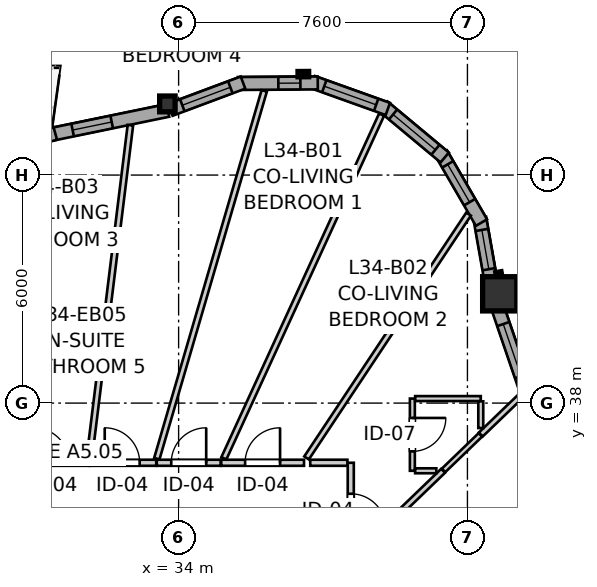
"""IFC4 building model, lengths in metres.
Left out: names, types, materials, properties, quantities, classifications, styles, units other than length and angle.
Written with IfcOpenShell. Run it as: python <this file> out.ifc"""

import sys

from ifc_helpers import new_model, si_unit, direction, frame, frame_2d, origin, origin_2d, place, context, subcontext, project, spatial, rectangle, i_section, extrude, source, transform, mapped, element, fill, save


model = new_model("IFC4")
c1 = context("Model", 3, precision=1e-05, world=origin(), true_north=direction((0.0, 1.0)))
c2 = subcontext(c1, "Body", "Model", "MODEL_VIEW")
j1 = project(units=[si_unit("LENGTHUNIT", "METRE"), si_unit("PLANEANGLEUNIT", "RADIAN")], contexts=[c1])
p1 = place(None, origin())
s1 = spatial("IfcSite", under=j1, at=p1, CompositionType="ELEMENT")
p2 = place(p1, origin())
s2 = spatial("IfcBuilding", under=s1, at=p2, CompositionType="ELEMENT")
p3 = place(p2, frame((0.0, 0.0, 115.2)))
s3 = spatial("IfcBuildingStorey", under=s2, at=p3, CompositionType="ELEMENT", Elevation=115.2)
m1 = source(origin(), c2, "Body", "SweptSolid", [
    extrude(rectangle(XDim=0.9, YDim=0.9, at=origin_2d()), origin(), (0.0, 0.0, 1.0), 2.95),
])
p4 = place(p3, frame((42.45, 40.875, 0.0), z_axis=(0.0, 0.0, 1.0), x_axis=(1.0, 0.0, 0.0)))
e1 = element("IfcColumn", 1, at=p4, inside=s3, PredefinedType="COLUMN", context=c2, shape_type="MappedRepresentation", body=[
    mapped(m1, transform((0.0, 0.0, 0.0), x_axis=(1.0, 0.0, 0.0), y_axis=(0.0, 1.0, 0.0), z_axis=(0.0, 0.0, 1.0), scale=1.0)),
])
m2 = source(origin(), c2, "Body", "SweptSolid", [
    extrude(i_section(OverallWidth=0.406, OverallDepth=0.416, WebThickness=0.027, FlangeThickness=0.044, FilletRadius=0.015, at=origin_2d()), origin(), (0.0, 0.0, 1.0), 2.95),
])
p5 = place(p3, frame((33.704, 45.872, 0.0), z_axis=(0.0, 0.0, 1.0), x_axis=(1.0, 0.0, 0.0)))
e2 = element("IfcColumn", 2, at=p5, inside=s3, PredefinedType="PILASTER", context=c2, shape_type="MappedRepresentation", body=[
    mapped(m2, transform((0.0, 0.0, 0.0), x_axis=(1.0, 0.0, 0.0), y_axis=(0.0, 1.0, 0.0), z_axis=(0.0, 0.0, 1.0), scale=1.0)),
])
p6 = place(p3, frame((43.319, 37.809, 0.0), z_axis=(0.0, 0.0, 1.0), x_axis=(-0.323586371726, 0.946198636669, 0.0)))
e3 = element("IfcWall", 3, at=p6, inside=s3, PredefinedType="SOLIDWALL", context=c2, shape_type="SweptSolid", body=[
    extrude(rectangle(XDim=2.952, YDim=0.34, at=frame_2d((1.476, 0.0))), origin(), (0.0, 0.0, 1.0), 2.48),
])
p7 = place(p6, frame((0.949, 0.0, 0.82)))
e4 = element("IfcOpeningElement", 4, at=p7, cuts=e3, PredefinedType="OPENING", context=c2, shape_type="SweptSolid", body=[
    extrude(rectangle(XDim=1.45, YDim=1.25, at=frame_2d((0.725, 0.625))), frame((0.0, 0.18, 0.0), z_axis=(0.0, -1.0, 0.0), x_axis=(1.0, 0.0, 0.0)), (0.0, 0.0, 1.0), 0.36),
])
p8 = place(p3, frame((42.242, 41.072, 0.0), z_axis=(0.0, 0.0, 1.0), x_axis=(-0.17440141227, 0.984674640375, 0.0)))
e5 = element("IfcWall", 5, at=p8, inside=s3, PredefinedType="SOLIDWALL", context=c2, shape_type="SweptSolid", body=[
    extrude(rectangle(XDim=1.831, YDim=0.34, at=frame_2d((0.916, 0.0))), origin(), (0.0, 0.0, 1.0), 2.48),
])
p9 = place(p8, frame((0.457, 0.0, 0.82)))
e6 = element("IfcOpeningElement", 6, at=p9, cuts=e5, PredefinedType="OPENING", context=c2, shape_type="SweptSolid", body=[
    extrude(rectangle(XDim=1.05, YDim=1.45, at=frame_2d((0.525, 0.725))), frame((0.0, 0.18, 0.0), z_axis=(0.0, -1.0, 0.0), x_axis=(1.0, 0.0, 0.0)), (0.0, 0.0, 1.0), 0.36),
])
p10 = place(p3, frame((41.969, 42.749, 0.0), z_axis=(0.0, 0.0, 1.0), x_axis=(-0.501989603552, 0.864873654313, 0.0)))
e7 = element("IfcWall", 7, at=p10, inside=s3, PredefinedType="SOLIDWALL", context=c2, shape_type="SweptSolid", body=[
    extrude(rectangle(XDim=2.099, YDim=0.34, at=frame_2d((1.05, 0.0))), origin(), (0.0, 0.0, 1.0), 2.48),
])
p11 = place(p10, frame((0.622, 0.0, 0.82)))
e8 = element("IfcOpeningElement", 8, at=p11, cuts=e7, PredefinedType="OPENING", context=c2, shape_type="SweptSolid", body=[
    extrude(rectangle(XDim=1.15, YDim=1.2, at=frame_2d((0.575, 0.6))), frame((0.0, 0.18, 0.0), z_axis=(0.0, -1.0, 0.0), x_axis=(1.0, 0.0, 0.0)), (0.0, 0.0, 1.0), 0.36),
])
p12 = place(p3, frame((41.002, 44.462, 0.0), z_axis=(0.0, 0.0, 1.0), x_axis=(-0.768488123124, 0.639864051669, 0.0)))
e9 = element("IfcWall", 9, at=p12, inside=s3, PredefinedType="SOLIDWALL", context=c2, shape_type="SweptSolid", body=[
    extrude(rectangle(XDim=2.099, YDim=0.34, at=frame_2d((1.05, 0.0))), origin(), (0.0, 0.0, 1.0), 2.48),
])
p13 = place(p12, frame((0.319, 0.0, 0.82)))
e10 = element("IfcOpeningElement", 10, at=p13, cuts=e9, PredefinedType="OPENING", context=c2, shape_type="SweptSolid", body=[
    extrude(rectangle(XDim=1.45, YDim=1.25, at=frame_2d((0.725, 0.625))), frame((0.0, 0.18, 0.0), z_axis=(0.0, -1.0, 0.0), x_axis=(1.0, 0.0, 0.0)), (0.0, 0.0, 1.0), 0.36),
])
p14 = place(p3, frame((39.506, 45.739, 0.0), z_axis=(0.0, 0.0, 1.0), x_axis=(-0.941486401639, 0.33705096874, 0.0)))
e11 = element("IfcWall", 11, at=p14, inside=s3, PredefinedType="SOLIDWALL", context=c2, shape_type="SweptSolid", body=[
    extrude(rectangle(XDim=2.099, YDim=0.34, at=frame_2d((1.05, 0.0))), origin(), (0.0, 0.0, 1.0), 2.48),
])
p15 = place(p14, frame((0.327, 0.0, 0.82)))
e12 = element("IfcOpeningElement", 12, at=p15, cuts=e11, PredefinedType="OPENING", context=c2, shape_type="SweptSolid", body=[
    extrude(rectangle(XDim=1.45, YDim=1.25, at=frame_2d((0.725, 0.625))), frame((0.0, 0.18, 0.0), z_axis=(0.0, -1.0, 0.0), x_axis=(1.0, 0.0, 0.0)), (0.0, 0.0, 1.0), 0.36),
])
p16 = place(p3, frame((37.662, 46.424, 0.0), z_axis=(0.0, 0.0, 1.0), x_axis=(-0.999976456891, -0.00686189939, 0.0)))
e13 = element("IfcWall", 13, at=p16, inside=s3, PredefinedType="SOLIDWALL", context=c2, shape_type="SweptSolid", body=[
    extrude(rectangle(XDim=2.099, YDim=0.34, at=frame_2d((1.05, 0.0))), origin(), (0.0, 0.0, 1.0), 2.48),
])
p17 = place(p16, frame((0.458, 0.0, 0.82)))
e14 = element("IfcOpeningElement", 14, at=p17, cuts=e13, PredefinedType="OPENING", context=c2, shape_type="SweptSolid", body=[
    extrude(rectangle(XDim=0.58, YDim=1.35, at=frame_2d((0.29, 0.675))), frame((0.0, 0.18, 0.0), z_axis=(0.0, -1.0, 0.0), x_axis=(1.0, 0.0, 0.0)), (0.0, 0.0, 1.0), 0.36),
])
p18 = place(p3, frame((35.695, 46.434, 0.0), z_axis=(0.0, 0.0, 1.0), x_axis=(-0.9368002254, -0.349864741994, 0.0)))
e15 = element("IfcWall", 15, at=p18, inside=s3, PredefinedType="SOLIDWALL", context=c2, shape_type="SweptSolid", body=[
    extrude(rectangle(XDim=2.041, YDim=0.34, at=frame_2d((1.021, 0.0))), origin(), (0.0, 0.0, 1.0), 2.48),
])
p19 = place(p18, frame((0.355, 0.0, 0.82)))
e16 = element("IfcOpeningElement", 16, at=p19, cuts=e15, PredefinedType="OPENING", context=c2, shape_type="SweptSolid", body=[
    extrude(rectangle(XDim=1.35, YDim=1.45, at=frame_2d((0.675, 0.725))), frame((0.0, 0.18, 0.0), z_axis=(0.0, -1.0, 0.0), x_axis=(1.0, 0.0, 0.0)), (0.0, 0.0, 1.0), 0.36),
])
p20 = place(p3, frame((33.719, 45.701, 0.0), z_axis=(0.0, 0.0, 1.0), x_axis=(-0.979417849231, -0.201843198072, 0.0)))
e17 = element("IfcWall", 17, at=p20, inside=s3, PredefinedType="SOLIDWALL", context=c2, shape_type="SweptSolid", body=[
    extrude(rectangle(XDim=3.113, YDim=0.34, at=frame_2d((1.557, 0.0))), origin(), (0.0, 0.0, 1.0), 2.48),
])
p21 = place(p20, frame((1.511, 0.0, 0.82)))
e18 = element("IfcOpeningElement", 18, at=p21, cuts=e17, PredefinedType="OPENING", context=c2, shape_type="SweptSolid", body=[
    extrude(rectangle(XDim=1.05, YDim=1.45, at=frame_2d((0.525, 0.725))), frame((0.0, 0.18, 0.0), z_axis=(0.0, -1.0, 0.0), x_axis=(1.0, 0.0, 0.0)), (0.0, 0.0, 1.0), 0.36),
])
p22 = place(p3, frame((30.755, 45.094, 0.0), z_axis=(0.0, 0.0, 1.0), x_axis=(-0.963040794714, -0.269355578589, 0.0)))
e19 = element("IfcWall", 19, at=p22, inside=s3, PredefinedType="SOLIDWALL", context=c2, shape_type="SweptSolid", body=[
    extrude(rectangle(XDim=2.839, YDim=0.34, at=frame_2d((1.419, 0.0))), origin(), (0.0, 0.0, 1.0), 2.48),
])
p23 = place(p22, frame((0.373, 0.0, 0.82)))
e20 = element("IfcOpeningElement", 20, at=p23, cuts=e19, PredefinedType="OPENING", context=c2, shape_type="SweptSolid", body=[
    extrude(rectangle(XDim=1.05, YDim=1.45, at=frame_2d((0.525, 0.725))), frame((0.0, 0.18, 0.0), z_axis=(0.0, -1.0, 0.0), x_axis=(1.0, 0.0, 0.0)), (0.0, 0.0, 1.0), 0.36),
])
p24 = place(p22, frame((1.792, 0.0, 0.82)))
e21 = element("IfcOpeningElement", 21, at=p24, cuts=e19, PredefinedType="OPENING", context=c2, shape_type="SweptSolid", body=[
    extrude(rectangle(XDim=0.58, YDim=1.35, at=frame_2d((0.29, 0.675))), frame((0.0, 0.18, 0.0), z_axis=(0.0, -1.0, 0.0), x_axis=(1.0, 0.0, 0.0)), (0.0, 0.0, 1.0), 0.36),
])
p25 = place(p3, frame((38.53, 36.43, 0.0), z_axis=(0.0, 0.0, 1.0), x_axis=(0.0, -1.0, 0.0)))
e22 = element("IfcWall", 22, at=p25, inside=s3, PredefinedType="PARTITIONING", context=c2, shape_type="SweptSolid", body=[
    extrude(rectangle(XDim=2.516, YDim=0.16, at=frame_2d((1.258, 0.0))), origin(), (0.0, 0.0, 1.0), 2.588),
])
p26 = place(p25, frame((0.816, 0.0, 0.0)))
e23 = element("IfcOpeningElement", 23, at=p26, cuts=e22, PredefinedType="OPENING", context=c2, shape_type="SweptSolid", body=[
    extrude(rectangle(XDim=0.92, YDim=2.1, at=frame_2d((0.46, 1.05))), frame((0.0, 0.09, 0.0), z_axis=(0.0, -1.0, 0.0), x_axis=(1.0, 0.0, 0.0)), (0.0, 0.0, 1.0), 0.18),
])
p27 = place(p3, frame((35.121, 36.43, 0.0), z_axis=(0.0, 0.0, 1.0), x_axis=(1.0, 0.0, 0.0)))
e24 = element("IfcWall", 24, at=p27, inside=s3, PredefinedType="PARTITIONING", context=c2, shape_type="SweptSolid", body=[
    extrude(rectangle(XDim=2.179, YDim=0.16, at=frame_2d((1.089, 0.0))), origin(), (0.0, 0.0, 1.0), 2.588),
])
p28 = place(p27, frame((0.628, 0.0, 0.0)))
e25 = element("IfcOpeningElement", 25, at=p28, cuts=e24, PredefinedType="OPENING", context=c2, shape_type="SweptSolid", body=[
    extrude(rectangle(XDim=0.92, YDim=2.1, at=frame_2d((0.46, 1.05))), frame((0.0, 0.09, 0.0), z_axis=(0.0, -1.0, 0.0), x_axis=(1.0, 0.0, 0.0)), (0.0, 0.0, 1.0), 0.18),
])
p29 = place(p3, frame((29.7, 36.43, 0.0), z_axis=(0.0, 0.0, 1.0), x_axis=(1.0, 0.0, 0.0)))
e26 = element("IfcWall", 26, at=p29, inside=s3, PredefinedType="PARTITIONING", context=c2, shape_type="SweptSolid", body=[
    extrude(rectangle(XDim=1.951, YDim=0.16, at=frame_2d((0.976, 0.0))), origin(), (0.0, 0.0, 1.0), 2.95),
])
p30 = place(p29, frame((0.493, 0.0, 0.0)))
e27 = element("IfcOpeningElement", 27, at=p30, cuts=e26, PredefinedType="OPENING", context=c2, shape_type="SweptSolid", body=[
    extrude(rectangle(XDim=0.92, YDim=2.1, at=frame_2d((0.46, 1.05))), frame((0.0, 0.09, 0.0), z_axis=(0.0, -1.0, 0.0), x_axis=(1.0, 0.0, 0.0)), (0.0, 0.0, 1.0), 0.18),
])
p31 = place(p3, frame((40.151, 38.119, 0.0), z_axis=(0.0, 0.0, 1.0), x_axis=(0.0, -1.0, 0.0)))
e28 = element("IfcWall", 28, at=p31, inside=s3, PredefinedType="PARTITIONING", context=c2, shape_type="SweptSolid", body=[
    extrude(rectangle(XDim=1.9, YDim=0.13, at=frame_2d((0.95, 0.0))), origin(), (0.0, 0.0, 1.0), 2.95),
])
p32 = place(p31, frame((0.51, 0.0, 0.0)))
e29 = element("IfcOpeningElement", 29, at=p32, cuts=e28, PredefinedType="OPENING", context=c2, shape_type="SweptSolid", body=[
    extrude(rectangle(XDim=0.88, YDim=2.05, at=frame_2d((0.44, 1.025))), frame((0.0, 0.075, 0.0), z_axis=(0.0, -1.0, 0.0), x_axis=(1.0, 0.0, 0.0)), (0.0, 0.0, 1.0), 0.15),
])
p33 = place(p3, frame((31.666, 36.43, 0.0), z_axis=(0.0, 0.0, 1.0), x_axis=(1.0, 0.0, 0.0)))
e30 = element("IfcWall", 30, at=p33, inside=s3, PredefinedType="PARTITIONING", context=c2, shape_type="SweptSolid", body=[
    extrude(rectangle(XDim=1.745, YDim=0.16, at=frame_2d((0.873, 0.0))), origin(), (0.0, 0.0, 1.0), 2.95),
])
p34 = place(p33, frame((0.389, 0.0, 0.0)))
e31 = element("IfcOpeningElement", 31, at=p34, cuts=e30, PredefinedType="OPENING", context=c2, shape_type="SweptSolid", body=[
    extrude(rectangle(XDim=0.92, YDim=2.1, at=frame_2d((0.46, 1.05))), frame((0.0, 0.09, 0.0), z_axis=(0.0, -1.0, 0.0), x_axis=(1.0, 0.0, 0.0)), (0.0, 0.0, 1.0), 0.18),
])
p35 = place(p3, frame((33.426, 36.43, 0.0), z_axis=(0.0, 0.0, 1.0), x_axis=(1.0, 0.0, 0.0)))
e32 = element("IfcWall", 32, at=p35, inside=s3, PredefinedType="PARTITIONING", context=c2, shape_type="SweptSolid", body=[
    extrude(rectangle(XDim=1.68, YDim=0.16, at=frame_2d((0.84, 0.0))), origin(), (0.0, 0.0, 1.0), 2.95),
])
p36 = place(p35, frame((0.38, 0.0, 0.0)))
e33 = element("IfcOpeningElement", 33, at=p36, cuts=e32, PredefinedType="OPENING", context=c2, shape_type="SweptSolid", body=[
    extrude(rectangle(XDim=0.92, YDim=2.1, at=frame_2d((0.46, 1.05))), frame((0.0, 0.09, 0.0), z_axis=(0.0, -1.0, 0.0), x_axis=(1.0, 0.0, 0.0)), (0.0, 0.0, 1.0), 0.18),
])
p37 = place(p3, frame((33.427, 36.538, 0.0), z_axis=(0.0, 0.0, 1.0), x_axis=(0.280326379037, 0.959904745908, 0.0)))
e34 = element("IfcWall", 34, at=p37, inside=s3, PredefinedType="PARTITIONING", context=c2, shape_type="SweptSolid", body=[
    extrude(rectangle(XDim=10.082, YDim=0.145, at=frame_2d((5.041, 0.0))), origin(), (0.0, 0.0, 1.0), 2.95),
])
p38 = place(p3, frame((35.191, 36.548, 0.0), z_axis=(0.0, 0.0, 1.0), x_axis=(0.417154036681, 0.908835799075, 0.0)))
e35 = element("IfcWall", 35, at=p38, inside=s3, PredefinedType="PARTITIONING", context=c2, shape_type="SweptSolid", body=[
    extrude(rectangle(XDim=9.949, YDim=0.145, at=frame_2d((4.974, 0.0))), origin(), (0.0, 0.0, 1.0), 2.95),
])
p39 = place(p3, frame((31.648, 36.527, 0.0), z_axis=(0.0, 0.0, 1.0), x_axis=(0.122371290087, 0.992484391496, 0.0)))
e36 = element("IfcWall", 36, at=p39, inside=s3, PredefinedType="PARTITIONING", context=c2, shape_type="SweptSolid", body=[
    extrude(rectangle(XDim=8.852, YDim=0.145, at=frame_2d((4.426, 0.0))), origin(), (0.0, 0.0, 1.0), 2.95),
])
p40 = place(p3, frame((37.366, 36.557, 0.0), z_axis=(0.0, 0.0, 1.0), x_axis=(0.553463679146, 0.832873313215, 0.0)))
e37 = element("IfcWall", 37, at=p40, inside=s3, PredefinedType="PARTITIONING", context=c2, shape_type="SweptSolid", body=[
    extrude(rectangle(XDim=7.704, YDim=0.145, at=frame_2d((3.852, 0.0))), origin(), (0.0, 0.0, 1.0), 2.95),
])
p41 = place(p3, frame((38.666, 34.009, 0.0), z_axis=(0.0, 0.0, 1.0), x_axis=(0.72031454127, 0.693647577402, 0.0)))
e38 = element("IfcWall", 38, at=p41, inside=s3, PredefinedType="PARTITIONING", context=c2, shape_type="SweptSolid", body=[
    extrude(rectangle(XDim=3.186, YDim=0.145, at=frame_2d((1.593, 0.0))), origin(), (0.0, 0.0, 1.0), 2.95),
])
p42 = place(p3, frame((40.224, 38.119, 0.0), z_axis=(0.0, 0.0, 1.0), x_axis=(1.0, 0.0, 0.0)))
e39 = element("IfcWall", 39, at=p42, inside=s3, PredefinedType="PARTITIONING", context=c2, shape_type="SweptSolid", body=[
    extrude(rectangle(XDim=1.727, YDim=0.13, at=frame_2d((0.863, 0.0))), origin(), (0.0, 0.0, 1.0), 2.95),
])
p43 = place(p3, frame((41.951, 37.173, 0.0), z_axis=(0.0, 0.0, 1.0), x_axis=(0.720559112487, 0.693393514111, 0.0)))
e40 = element("IfcWall", 40, at=p43, inside=s3, PredefinedType="PARTITIONING", context=c2, shape_type="SweptSolid", body=[
    extrude(rectangle(XDim=1.456, YDim=0.145, at=frame_2d((0.728, 0.0))), origin(), (0.0, 0.0, 1.0), 2.95),
])
p44 = place(p3, frame((40.972, 36.229, 0.0), z_axis=(0.0, 0.0, 1.0), x_axis=(0.72014550452, 0.693823069896, 0.0)))
e41 = element("IfcWall", 41, at=p44, inside=s3, PredefinedType="PARTITIONING", context=c2, shape_type="SweptSolid", body=[
    extrude(rectangle(XDim=1.345, YDim=0.13, at=frame_2d((0.672, 0.0))), origin(), (0.0, 0.0, 1.0), 2.95),
])
p45 = place(p3, frame((37.463, 36.43, 0.0), z_axis=(0.0, 0.0, 1.0), x_axis=(1.0, 0.0, 0.0)))
e42 = element("IfcWall", 42, at=p45, inside=s3, PredefinedType="PARTITIONING", context=c2, shape_type="SweptSolid", body=[
    extrude(rectangle(XDim=0.979, YDim=0.16, at=frame_2d((0.489, 0.0))), origin(), (0.0, 0.0, 1.0), 2.588),
])
p46 = place(p3, frame((41.951, 37.344, 0.0), z_axis=(0.0, 0.0, 1.0), x_axis=(0.0, 1.0, 0.0)))
e43 = element("IfcWall", 43, at=p46, inside=s3, PredefinedType="PARTITIONING", context=c2, shape_type="SweptSolid", body=[
    extrude(rectangle(XDim=0.702, YDim=0.13, at=frame_2d((0.351, 0.0))), origin(), (0.0, 0.0, 1.0), 2.95),
])
p47 = place(p3, frame((40.224, 36.219, 0.0), z_axis=(0.0, 0.0, 1.0), x_axis=(1.0, 0.0, 0.0)))
e44 = element("IfcWall", 44, at=p47, inside=s3, PredefinedType="PARTITIONING", context=c2, shape_type="SweptSolid", body=[
    extrude(rectangle(XDim=0.557, YDim=0.13, at=frame_2d((0.278, 0.0))), origin(), (0.0, 0.0, 1.0), 2.95),
])
m3 = source(origin(), c2, "Body", "SweptSolid", [
    extrude(rectangle(XDim=1.45, YDim=1.25, at=frame_2d((0.725, 0.625))), frame((0.0, 0.03, 0.0), z_axis=(0.0, -1.0, 0.0), x_axis=(1.0, 0.0, 0.0)), (0.0, 0.0, 1.0), 0.06),
])
p48 = place(p7, origin())
e45 = element("IfcWindow", 45, at=p48, inside=s3, PartitioningType="SINGLE_PANEL", PredefinedType="WINDOW", context=c2, shape_type="MappedRepresentation", body=[
    mapped(m3, transform((0.0, 0.0, 0.0), x_axis=(1.0, 0.0, 0.0), y_axis=(0.0, 1.0, 0.0), z_axis=(0.0, 0.0, 1.0), scale=1.0)),
])
fill(e4, e45)
m4 = source(origin(), c2, "Body", "SweptSolid", [
    extrude(rectangle(XDim=1.05, YDim=1.45, at=frame_2d((0.525, 0.725))), frame((0.0, 0.03, 0.0), z_axis=(0.0, -1.0, 0.0), x_axis=(1.0, 0.0, 0.0)), (0.0, 0.0, 1.0), 0.06),
])
p49 = place(p9, origin())
e46 = element("IfcWindow", 46, at=p49, inside=s3, PartitioningType="SINGLE_PANEL", PredefinedType="WINDOW", context=c2, shape_type="MappedRepresentation", body=[
    mapped(m4, transform((0.0, 0.0, 0.0), x_axis=(1.0, 0.0, 0.0), y_axis=(0.0, 1.0, 0.0), z_axis=(0.0, 0.0, 1.0), scale=1.0)),
])
fill(e6, e46)
m5 = source(origin(), c2, "Body", "SweptSolid", [
    extrude(rectangle(XDim=1.15, YDim=1.2, at=frame_2d((0.575, 0.6))), frame((0.0, 0.03, 0.0), z_axis=(0.0, -1.0, 0.0), x_axis=(1.0, 0.0, 0.0)), (0.0, 0.0, 1.0), 0.06),
])
p50 = place(p11, origin())
e47 = element("IfcWindow", 47, at=p50, inside=s3, PartitioningType="SINGLE_PANEL", PredefinedType="WINDOW", context=c2, shape_type="MappedRepresentation", body=[
    mapped(m5, transform((0.0, 0.0, 0.0), x_axis=(1.0, 0.0, 0.0), y_axis=(0.0, 1.0, 0.0), z_axis=(0.0, 0.0, 1.0), scale=1.0)),
])
fill(e8, e47)
p51 = place(p13, origin())
e48 = element("IfcWindow", 48, at=p51, inside=s3, PartitioningType="SINGLE_PANEL", PredefinedType="WINDOW", context=c2, shape_type="MappedRepresentation", body=[
    mapped(m3, transform((0.0, 0.0, 0.0), x_axis=(1.0, 0.0, 0.0), y_axis=(0.0, 1.0, 0.0), z_axis=(0.0, 0.0, 1.0), scale=1.0)),
])
fill(e10, e48)
p52 = place(p15, origin())
e49 = element("IfcWindow", 49, at=p52, inside=s3, PartitioningType="SINGLE_PANEL", PredefinedType="WINDOW", context=c2, shape_type="MappedRepresentation", body=[
    mapped(m3, transform((0.0, 0.0, 0.0), x_axis=(1.0, 0.0, 0.0), y_axis=(0.0, 1.0, 0.0), z_axis=(0.0, 0.0, 1.0), scale=1.0)),
])
fill(e12, e49)
m6 = source(origin(), c2, "Body", "SweptSolid", [
    extrude(rectangle(XDim=0.58, YDim=1.35, at=frame_2d((0.29, 0.675))), frame((0.0, 0.03, 0.0), z_axis=(0.0, -1.0, 0.0), x_axis=(1.0, 0.0, 0.0)), (0.0, 0.0, 1.0), 0.06),
])
p53 = place(p17, origin())
e50 = element("IfcWindow", 50, at=p53, inside=s3, PartitioningType="SINGLE_PANEL", PredefinedType="WINDOW", context=c2, shape_type="MappedRepresentation", body=[
    mapped(m6, transform((0.0, 0.0, 0.0), x_axis=(1.0, 0.0, 0.0), y_axis=(0.0, 1.0, 0.0), z_axis=(0.0, 0.0, 1.0), scale=1.0)),
])
fill(e14, e50)
m7 = source(origin(), c2, "Body", "SweptSolid", [
    extrude(rectangle(XDim=1.35, YDim=1.45, at=frame_2d((0.675, 0.725))), frame((0.0, 0.03, 0.0), z_axis=(0.0, -1.0, 0.0), x_axis=(1.0, 0.0, 0.0)), (0.0, 0.0, 1.0), 0.06),
])
p54 = place(p19, origin())
e51 = element("IfcWindow", 51, at=p54, inside=s3, PartitioningType="SINGLE_PANEL", PredefinedType="WINDOW", context=c2, shape_type="MappedRepresentation", body=[
    mapped(m7, transform((0.0, 0.0, 0.0), x_axis=(1.0, 0.0, 0.0), y_axis=(0.0, 1.0, 0.0), z_axis=(0.0, 0.0, 1.0), scale=1.0)),
])
fill(e16, e51)
p55 = place(p21, origin())
e52 = element("IfcWindow", 52, at=p55, inside=s3, PartitioningType="SINGLE_PANEL", PredefinedType="WINDOW", context=c2, shape_type="MappedRepresentation", body=[
    mapped(m4, transform((0.0, 0.0, 0.0), x_axis=(1.0, 0.0, 0.0), y_axis=(0.0, 1.0, 0.0), z_axis=(0.0, 0.0, 1.0), scale=1.0)),
])
fill(e18, e52)
m8 = source(origin(), c2, "Body", "SweptSolid", [
    extrude(rectangle(XDim=0.92, YDim=2.1, at=frame_2d((0.46, 1.05))), frame((0.0, 0.025, 0.0), z_axis=(0.0, -1.0, 0.0), x_axis=(1.0, 0.0, 0.0)), (0.0, 0.0, 1.0), 0.05),
])
p56 = place(p26, origin())
e53 = element("IfcDoor", 53, at=p56, inside=s3, OperationType="SINGLE_SWING_RIGHT", PredefinedType="DOOR", context=c2, shape_type="MappedRepresentation", body=[
    mapped(m8, transform((0.0, 0.0, 0.0), x_axis=(1.0, 0.0, 0.0), y_axis=(0.0, 1.0, 0.0), z_axis=(0.0, 0.0, 1.0), scale=1.0)),
])
fill(e23, e53)
p57 = place(p28, origin())
e54 = element("IfcDoor", 54, at=p57, inside=s3, OperationType="SINGLE_SWING_RIGHT", PredefinedType="DOOR", context=c2, shape_type="MappedRepresentation", body=[
    mapped(m8, transform((0.0, 0.0, 0.0), x_axis=(1.0, 0.0, 0.0), y_axis=(0.0, 1.0, 0.0), z_axis=(0.0, 0.0, 1.0), scale=1.0)),
])
fill(e25, e54)
p58 = place(p30, origin())
e55 = element("IfcDoor", 55, at=p58, inside=s3, OperationType="SINGLE_SWING_LEFT", PredefinedType="DOOR", context=c2, shape_type="MappedRepresentation", body=[
    mapped(m8, transform((0.0, 0.0, 0.0), x_axis=(1.0, 0.0, 0.0), y_axis=(0.0, 1.0, 0.0), z_axis=(0.0, 0.0, 1.0), scale=1.0)),
])
fill(e27, e55)
m9 = source(origin(), c2, "Body", "SweptSolid", [
    extrude(rectangle(XDim=0.88, YDim=2.05, at=frame_2d((0.44, 1.025))), frame((0.0, 0.025, 0.0), z_axis=(0.0, -1.0, 0.0), x_axis=(1.0, 0.0, 0.0)), (0.0, 0.0, 1.0), 0.05),
])
p59 = place(p32, origin())
e56 = element("IfcDoor", 56, at=p59, inside=s3, OperationType="SINGLE_SWING_LEFT", PredefinedType="DOOR", context=c2, shape_type="MappedRepresentation", body=[
    mapped(m9, transform((0.0, 0.0, 0.0), x_axis=(1.0, 0.0, 0.0), y_axis=(0.0, 1.0, 0.0), z_axis=(0.0, 0.0, 1.0), scale=1.0)),
])
fill(e29, e56)
p60 = place(p34, origin())
e57 = element("IfcDoor", 57, at=p60, inside=s3, OperationType="SINGLE_SWING_LEFT", PredefinedType="DOOR", context=c2, shape_type="MappedRepresentation", body=[
    mapped(m8, transform((0.0, 0.0, 0.0), x_axis=(1.0, 0.0, 0.0), y_axis=(0.0, 1.0, 0.0), z_axis=(0.0, 0.0, 1.0), scale=1.0)),
])
fill(e31, e57)
p61 = place(p36, origin())
e58 = element("IfcDoor", 58, at=p61, inside=s3, OperationType="SINGLE_SWING_RIGHT", PredefinedType="DOOR", context=c2, shape_type="MappedRepresentation", body=[
    mapped(m8, transform((0.0, 0.0, 0.0), x_axis=(1.0, 0.0, 0.0), y_axis=(0.0, 1.0, 0.0), z_axis=(0.0, 0.0, 1.0), scale=1.0)),
])
fill(e33, e58)
save(model, sys.argv[1])
